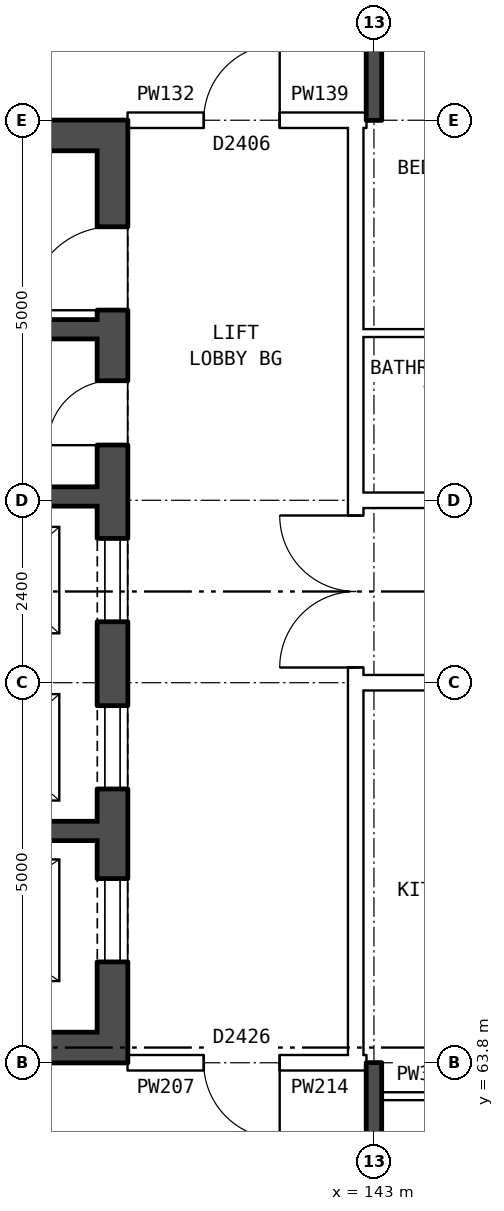
"""IFC4 building model, lengths in metres.
Left out: names, types, materials, properties, quantities, classifications, styles, units other than length and angle.
Written with IfcOpenShell. Run it as: python <this file> out.ifc"""

import sys

from ifc_helpers import new_model, si_unit, direction, frame, frame_2d, origin, place, context, subcontext, project, spatial, rectangle, extrude, element, fill, save


model = new_model("IFC4")
c1 = context("Model", 3, precision=1e-05, world=origin(), true_north=direction((0.0, 1.0)))
c2 = subcontext(c1, "Body", "Model", "MODEL_VIEW")
j1 = project(units=[si_unit("LENGTHUNIT", "METRE"), si_unit("PLANEANGLEUNIT", "RADIAN")], contexts=[c1])
p1 = place(None, origin())
s1 = spatial("IfcSite", under=j1, at=p1, CompositionType="ELEMENT")
p2 = place(p1, origin())
s2 = spatial("IfcBuilding", under=s1, at=p2, CompositionType="ELEMENT")
p3 = place(p2, frame((0.0, 0.0, 221.4)))
s3 = spatial("IfcBuildingStorey", under=s2, at=p3, CompositionType="ELEMENT", Elevation=221.4)
p4 = place(p3, frame((139.56, 63.8, 0.0), z_axis=(0.0, 0.0, 1.0), x_axis=(0.0, 1.0, 0.0)))
e1 = element("IfcWall", 1, at=p4, inside=s3, PredefinedType="SHEAR", context=c2, shape_type="SweptSolid", body=[
    extrude(rectangle(XDim=12.4, YDim=0.4, at=frame_2d((6.2, 0.0))), origin(), (0.0, 0.0, 1.0), 2.85),
])
p5 = place(p4, frame((1.325, 0.0, 0.0)))
e2 = element("IfcOpeningElement", 2, at=p5, cuts=e1, PredefinedType="OPENING", context=c2, shape_type="SweptSolid", body=[
    extrude(rectangle(XDim=1.1, YDim=2.1, at=frame_2d((0.55, 1.05))), frame((0.0, 0.21, 0.0), z_axis=(0.0, -1.0, 0.0), x_axis=(1.0, 0.0, 0.0)), (0.0, 0.0, 1.0), 0.42),
])
p6 = place(p4, frame((3.6, 0.0, 0.0)))
e3 = element("IfcOpeningElement", 3, at=p6, cuts=e1, PredefinedType="OPENING", context=c2, shape_type="SweptSolid", body=[
    extrude(rectangle(XDim=1.1, YDim=2.1, at=frame_2d((0.55, 1.05))), frame((0.0, 0.21, 0.0), z_axis=(0.0, -1.0, 0.0), x_axis=(1.0, 0.0, 0.0)), (0.0, 0.0, 1.0), 0.42),
])
p7 = place(p4, frame((5.8, 0.0, 0.0)))
e4 = element("IfcOpeningElement", 4, at=p7, cuts=e1, PredefinedType="OPENING", context=c2, shape_type="SweptSolid", body=[
    extrude(rectangle(XDim=1.1, YDim=2.1, at=frame_2d((0.55, 1.05))), frame((0.0, 0.21, 0.0), z_axis=(0.0, -1.0, 0.0), x_axis=(1.0, 0.0, 0.0)), (0.0, 0.0, 1.0), 0.42),
])
p8 = place(p4, frame((9.9, 0.0, 0.0)))
e5 = element("IfcOpeningElement", 5, at=p8, cuts=e1, PredefinedType="OPENING", context=c2, shape_type="SweptSolid", body=[
    extrude(rectangle(XDim=1.1, YDim=2.1, at=frame_2d((0.55, 1.05))), frame((0.0, 0.21, 0.0), z_axis=(0.0, -1.0, 0.0), x_axis=(1.0, 0.0, 0.0)), (0.0, 0.0, 1.0), 0.42),
])
p9 = place(p4, frame((8.125, 0.0, 0.0)))
e6 = element("IfcOpeningElement", 6, at=p9, cuts=e1, PredefinedType="OPENING", context=c2, shape_type="SweptSolid", body=[
    extrude(rectangle(XDim=0.85, YDim=2.1, at=frame_2d((0.425, 1.05))), frame((0.0, 0.21, 0.0), z_axis=(0.0, -1.0, 0.0), x_axis=(1.0, 0.0, 0.0)), (0.0, 0.0, 1.0), 0.42),
])
for number, where, z_axis, x_axis in (
    (7, (139.36, 64.0, 0.0), (0.0, 0.0, 1.0), (-1.0, 0.0, 0.0)),
    (8, (139.36, 76.0, 0.0), (0.0, 0.0, 1.0), (-1.0, 0.0, 0.0)),
):
    element("IfcWall", number, at=place(p3, frame(where, z_axis=z_axis, x_axis=x_axis)), inside=s3, PredefinedType="SHEAR", context=c2, shape_type="SweptSolid", body=[
        extrude(rectangle(XDim=7.6, YDim=0.4, at=frame_2d((3.8, 0.0))), origin(), (0.0, 0.0, 1.0), 2.85),
    ])
p10 = place(p3, frame((139.36, 66.85, 0.0), z_axis=(0.0, 0.0, 1.0), x_axis=(-1.0, 0.0, 0.0)))
e9 = element("IfcWall", 9, at=p10, inside=s3, PredefinedType="SHEAR", context=c2, shape_type="SweptSolid", body=[
    extrude(rectangle(XDim=4.775, YDim=0.25, at=frame_2d((2.388, 0.0))), origin(), (0.0, 0.0, 1.0), 2.85),
])
p11 = place(p3, frame((139.36, 71.25, 0.0), z_axis=(0.0, 0.0, 1.0), x_axis=(-1.0, 0.0, 0.0)))
e10 = element("IfcWall", 10, at=p11, inside=s3, PredefinedType="SHEAR", context=c2, shape_type="SweptSolid", body=[
    extrude(rectangle(XDim=7.6, YDim=0.25, at=frame_2d((3.8, 0.0))), origin(), (0.0, 0.0, 1.0), 2.85),
])
p12 = place(p11, frame((5.175, 0.0, 0.0)))
e11 = element("IfcOpeningElement", 11, at=p12, cuts=e10, PredefinedType="OPENING", context=c2, shape_type="SweptSolid", body=[
    extrude(rectangle(XDim=1.1, YDim=2.1, at=frame_2d((0.55, 1.05))), frame((0.0, 0.135, 0.0), z_axis=(0.0, -1.0, 0.0), x_axis=(1.0, 0.0, 0.0)), (0.0, 0.0, 1.0), 0.27),
])
p13 = place(p11, frame((3.35, 0.0, 0.0)))
e12 = element("IfcOpeningElement", 12, at=p13, cuts=e10, PredefinedType="OPENING", context=c2, shape_type="SweptSolid", body=[
    extrude(rectangle(XDim=0.85, YDim=2.1, at=frame_2d((0.425, 1.05))), frame((0.0, 0.135, 0.0), z_axis=(0.0, -1.0, 0.0), x_axis=(1.0, 0.0, 0.0)), (0.0, 0.0, 1.0), 0.27),
])
p14 = place(p3, frame((139.36, 73.45, 0.0), z_axis=(0.0, 0.0, 1.0), x_axis=(-1.0, 0.0, 0.0)))
e13 = element("IfcWall", 13, at=p14, inside=s3, PredefinedType="SHEAR", context=c2, shape_type="SweptSolid", body=[
    extrude(rectangle(XDim=2.525, YDim=0.25, at=frame_2d((1.263, 0.0))), origin(), (0.0, 0.0, 1.0), 2.85),
])
p15 = place(p3, frame((142.76, 63.9, 0.0), z_axis=(0.0, 0.0, 1.0), x_axis=(0.0, 1.0, 0.0)))
e14 = element("IfcWall", 14, at=p15, inside=s3, PredefinedType="PARTITIONING", context=c2, shape_type="SweptSolid", body=[
    extrude(rectangle(XDim=12.2, YDim=0.2, at=frame_2d((6.1, 0.0))), origin(), (0.0, 0.0, 1.0), 2.85),
])
p16 = place(p15, frame((5.1, 0.0, 0.0)))
e15 = element("IfcOpeningElement", 15, at=p16, cuts=e14, PredefinedType="OPENING", context=c2, shape_type="SweptSolid", body=[
    extrude(rectangle(XDim=2.0, YDim=2.1, at=frame_2d((1.0, 1.05))), frame((0.0, 0.11, 0.0), z_axis=(0.0, -1.0, 0.0), x_axis=(1.0, 0.0, 0.0)), (0.0, 0.0, 1.0), 0.22),
])
p17 = place(p3, frame((143.1, 63.36, 0.0), z_axis=(0.0, 0.0, 1.0), x_axis=(1.0, 0.0, 0.0)))
e16 = element("IfcWall", 16, at=p17, inside=s3, PredefinedType="PARTITIONING", context=c2, shape_type="SweptSolid", body=[
    extrude(rectangle(XDim=2.9, YDim=0.1, at=frame_2d((1.45, 0.0))), origin(), (0.0, 0.0, 1.0), 2.85),
])
p18 = place(p17, frame((1.0, 0.0, 0.0)))
e17 = element("IfcOpeningElement", 17, at=p18, cuts=e16, PredefinedType="OPENING", context=c2, shape_type="SweptSolid", body=[
    extrude(rectangle(XDim=0.9, YDim=2.1, at=frame_2d((0.45, 1.05))), frame((0.0, 0.06, 0.0), z_axis=(0.0, -1.0, 0.0), x_axis=(1.0, 0.0, 0.0)), (0.0, 0.0, 1.0), 0.12),
])
p19 = place(p3, frame((139.76, 63.8, 0.0), z_axis=(0.0, 0.0, 1.0), x_axis=(1.0, 0.0, 0.0)))
e18 = element("IfcWall", 18, at=p19, inside=s3, PredefinedType="PARTITIONING", context=c2, shape_type="SweptSolid", body=[
    extrude(rectangle(XDim=3.0, YDim=0.2, at=frame_2d((1.5, 0.0))), origin(), (0.0, 0.0, 1.0), 2.85),
])
p20 = place(p19, frame((1.0, 0.0, 0.0)))
e19 = element("IfcOpeningElement", 19, at=p20, cuts=e18, PredefinedType="OPENING", context=c2, shape_type="SweptSolid", body=[
    extrude(rectangle(XDim=1.0, YDim=2.1, at=frame_2d((0.5, 1.05))), frame((0.0, 0.11, 0.0), z_axis=(0.0, -1.0, 0.0), x_axis=(1.0, 0.0, 0.0)), (0.0, 0.0, 1.0), 0.22),
])
p21 = place(p3, frame((142.76, 63.8, 0.0), z_axis=(0.0, 0.0, 1.0), x_axis=(1.0, 0.0, 0.0)))
e20 = element("IfcWall", 20, at=p21, inside=s3, PredefinedType="PARTITIONING", context=c2, shape_type="SweptSolid", body=[
    extrude(rectangle(XDim=0.14, YDim=0.2, at=frame_2d((0.07, 0.0))), origin(), (0.0, 0.0, 1.0), 2.85),
])
p22 = place(p3, frame((142.76, 68.8, 0.0), z_axis=(0.0, 0.0, 1.0), x_axis=(1.0, 0.0, 0.0)))
e21 = element("IfcWall", 21, at=p22, inside=s3, PredefinedType="PARTITIONING", context=c2, shape_type="SweptSolid", body=[
    extrude(rectangle(XDim=14.48, YDim=0.2, at=frame_2d((7.24, 0.0))), origin(), (0.0, 0.0, 1.0), 2.85),
])
p23 = place(p22, frame((1.12, 0.0, 0.0)))
e22 = element("IfcOpeningElement", 22, at=p23, cuts=e21, PredefinedType="OPENING", context=c2, shape_type="SweptSolid", body=[
    extrude(rectangle(XDim=1.0, YDim=2.1, at=frame_2d((0.5, 1.05))), frame((0.0, 0.11, 0.0), z_axis=(0.0, -1.0, 0.0), x_axis=(1.0, 0.0, 0.0)), (0.0, 0.0, 1.0), 0.22),
])
p24 = place(p22, frame((10.24, 0.0, 0.0)))
e23 = element("IfcOpeningElement", 23, at=p24, cuts=e21, PredefinedType="OPENING", context=c2, shape_type="SweptSolid", body=[
    extrude(rectangle(XDim=1.0, YDim=2.1, at=frame_2d((0.5, 1.05))), frame((0.0, 0.11, 0.0), z_axis=(0.0, -1.0, 0.0), x_axis=(1.0, 0.0, 0.0)), (0.0, 0.0, 1.0), 0.22),
])
p25 = place(p3, frame((142.76, 71.2, 0.0), z_axis=(0.0, 0.0, 1.0), x_axis=(1.0, 0.0, 0.0)))
e24 = element("IfcWall", 24, at=p25, inside=s3, PredefinedType="PARTITIONING", context=c2, shape_type="SweptSolid", body=[
    extrude(rectangle(XDim=14.48, YDim=0.2, at=frame_2d((7.24, 0.0))), origin(), (0.0, 0.0, 1.0), 2.85),
])
p26 = place(p25, frame((4.24, 0.0, 0.0)))
e25 = element("IfcOpeningElement", 25, at=p26, cuts=e24, PredefinedType="OPENING", context=c2, shape_type="SweptSolid", body=[
    extrude(rectangle(XDim=1.0, YDim=2.1, at=frame_2d((0.5, 1.05))), frame((0.0, 0.11, 0.0), z_axis=(0.0, -1.0, 0.0), x_axis=(1.0, 0.0, 0.0)), (0.0, 0.0, 1.0), 0.22),
])
p27 = place(p25, frame((10.24, 0.0, 0.0)))
e26 = element("IfcOpeningElement", 26, at=p27, cuts=e24, PredefinedType="OPENING", context=c2, shape_type="SweptSolid", body=[
    extrude(rectangle(XDim=1.0, YDim=2.1, at=frame_2d((0.5, 1.05))), frame((0.0, 0.11, 0.0), z_axis=(0.0, -1.0, 0.0), x_axis=(1.0, 0.0, 0.0)), (0.0, 0.0, 1.0), 0.22),
])
p28 = place(p3, frame((142.76, 73.4, 0.0), z_axis=(0.0, 0.0, 1.0), x_axis=(1.0, 0.0, 0.0)))
e27 = element("IfcWall", 27, at=p28, inside=s3, PredefinedType="PARTITIONING", context=c2, shape_type="SweptSolid", body=[
    extrude(rectangle(XDim=3.24, YDim=0.1, at=frame_2d((1.62, 0.0))), origin(), (0.0, 0.0, 1.0), 2.85),
])
p29 = place(p3, frame((139.76, 76.2, 0.0), z_axis=(0.0, 0.0, 1.0), x_axis=(1.0, 0.0, 0.0)))
e28 = element("IfcWall", 28, at=p29, inside=s3, PredefinedType="PARTITIONING", context=c2, shape_type="SweptSolid", body=[
    extrude(rectangle(XDim=3.0, YDim=0.2, at=frame_2d((1.5, 0.0))), origin(), (0.0, 0.0, 1.0), 2.85),
])
p30 = place(p29, frame((1.0, 0.0, 0.0)))
e29 = element("IfcOpeningElement", 29, at=p30, cuts=e28, PredefinedType="OPENING", context=c2, shape_type="SweptSolid", body=[
    extrude(rectangle(XDim=1.0, YDim=2.1, at=frame_2d((0.5, 1.05))), frame((0.0, 0.11, 0.0), z_axis=(0.0, -1.0, 0.0), x_axis=(1.0, 0.0, 0.0)), (0.0, 0.0, 1.0), 0.22),
])
p31 = place(p3, frame((142.76, 76.2, 0.0), z_axis=(0.0, 0.0, 1.0), x_axis=(1.0, 0.0, 0.0)))
e30 = element("IfcWall", 30, at=p31, inside=s3, PredefinedType="PARTITIONING", context=c2, shape_type="SweptSolid", body=[
    extrude(rectangle(XDim=0.14, YDim=0.2, at=frame_2d((0.07, 0.0))), origin(), (0.0, 0.0, 1.0), 2.85),
])
for number, where, z_axis, x_axis in (
    (31, (143.0, 54.36, 0.0), (0.0, 0.0, 1.0), (0.0, 1.0, 0.0)),
    (32, (143.0, 76.2, 0.0), (0.0, 0.0, 1.0), (0.0, 1.0, 0.0)),
):
    element("IfcWall", number, at=place(p3, frame(where, z_axis=z_axis, x_axis=x_axis)), inside=s3, PredefinedType="SOLIDWALL", context=c2, shape_type="SweptSolid", body=[
        extrude(rectangle(XDim=9.44, YDim=0.2, at=frame_2d((4.72, 0.0))), origin(), (0.0, 0.0, 1.0), 2.85),
    ])
p32 = place(p5, origin())
e33 = element("IfcDoor", 33, at=p32, inside=s3, OperationType="DOUBLE_DOOR_SLIDING", PredefinedType="DOOR", context=c2, shape_type="SweptSolid", body=[
    extrude(rectangle(XDim=1.1, YDim=2.1, at=frame_2d((0.55, 1.05))), frame((0.0, 0.185, 0.0), z_axis=(0.0, -1.0, 0.0), x_axis=(1.0, 0.0, 0.0)), (0.0, 0.0, 1.0), 0.05),
])
fill(e2, e33)
p33 = place(p6, origin())
e34 = element("IfcDoor", 34, at=p33, inside=s3, OperationType="DOUBLE_DOOR_SLIDING", PredefinedType="DOOR", context=c2, shape_type="SweptSolid", body=[
    extrude(rectangle(XDim=1.1, YDim=2.1, at=frame_2d((0.55, 1.05))), frame((0.0, 0.185, 0.0), z_axis=(0.0, -1.0, 0.0), x_axis=(1.0, 0.0, 0.0)), (0.0, 0.0, 1.0), 0.05),
])
fill(e3, e34)
p34 = place(p7, origin())
e35 = element("IfcDoor", 35, at=p34, inside=s3, OperationType="DOUBLE_DOOR_SLIDING", PredefinedType="DOOR", context=c2, shape_type="SweptSolid", body=[
    extrude(rectangle(XDim=1.1, YDim=2.1, at=frame_2d((0.55, 1.05))), frame((0.0, 0.185, 0.0), z_axis=(0.0, -1.0, 0.0), x_axis=(1.0, 0.0, 0.0)), (0.0, 0.0, 1.0), 0.05),
])
fill(e4, e35)
p35 = place(p8, origin())
e36 = element("IfcDoor", 36, at=p35, inside=s3, OperationType="SINGLE_SWING_LEFT", PredefinedType="DOOR", context=c2, shape_type="SweptSolid", body=[
    extrude(rectangle(XDim=1.1, YDim=2.1, at=frame_2d((0.55, 1.05))), frame((0.0, 0.185, 0.0), z_axis=(0.0, -1.0, 0.0), x_axis=(1.0, 0.0, 0.0)), (0.0, 0.0, 1.0), 0.05),
])
fill(e5, e36)
p36 = place(p9, origin())
e37 = element("IfcDoor", 37, at=p36, inside=s3, OperationType="SINGLE_SWING_LEFT", PredefinedType="DOOR", context=c2, shape_type="SweptSolid", body=[
    extrude(rectangle(XDim=0.85, YDim=2.1, at=frame_2d((0.425, 1.05))), frame((0.0, 0.185, 0.0), z_axis=(0.0, -1.0, 0.0), x_axis=(1.0, 0.0, 0.0)), (0.0, 0.0, 1.0), 0.05),
])
fill(e6, e37)
p37 = place(p16, origin())
e38 = element("IfcDoor", 38, at=p37, inside=s3, OperationType="DOUBLE_DOOR_SINGLE_SWING", PredefinedType="DOOR", context=c2, shape_type="SweptSolid", body=[
    extrude(rectangle(XDim=2.0, YDim=2.1, at=frame_2d((1.0, 1.05))), frame((0.0, 0.025, 0.0), z_axis=(0.0, -1.0, 0.0), x_axis=(1.0, 0.0, 0.0)), (0.0, 0.0, 1.0), 0.05),
])
fill(e15, e38)
p38 = place(p20, frame((1.0, 0.0, 0.0), z_axis=(0.0, 0.0, 1.0), x_axis=(-1.0, 0.0, 0.0)))
e39 = element("IfcDoor", 39, at=p38, inside=s3, OperationType="SINGLE_SWING_LEFT", PredefinedType="DOOR", context=c2, shape_type="SweptSolid", body=[
    extrude(rectangle(XDim=1.0, YDim=2.1, at=frame_2d((0.5, 1.05))), frame((0.0, 0.025, 0.0), z_axis=(0.0, -1.0, 0.0), x_axis=(1.0, 0.0, 0.0)), (0.0, 0.0, 1.0), 0.05),
])
fill(e19, e39)
p39 = place(p30, origin())
e40 = element("IfcDoor", 40, at=p39, inside=s3, OperationType="SINGLE_SWING_RIGHT", PredefinedType="DOOR", context=c2, shape_type="SweptSolid", body=[
    extrude(rectangle(XDim=1.0, YDim=2.1, at=frame_2d((0.5, 1.05))), frame((0.0, 0.025, 0.0), z_axis=(0.0, -1.0, 0.0), x_axis=(1.0, 0.0, 0.0)), (0.0, 0.0, 1.0), 0.05),
])
fill(e29, e40)
save(model, sys.argv[1])
